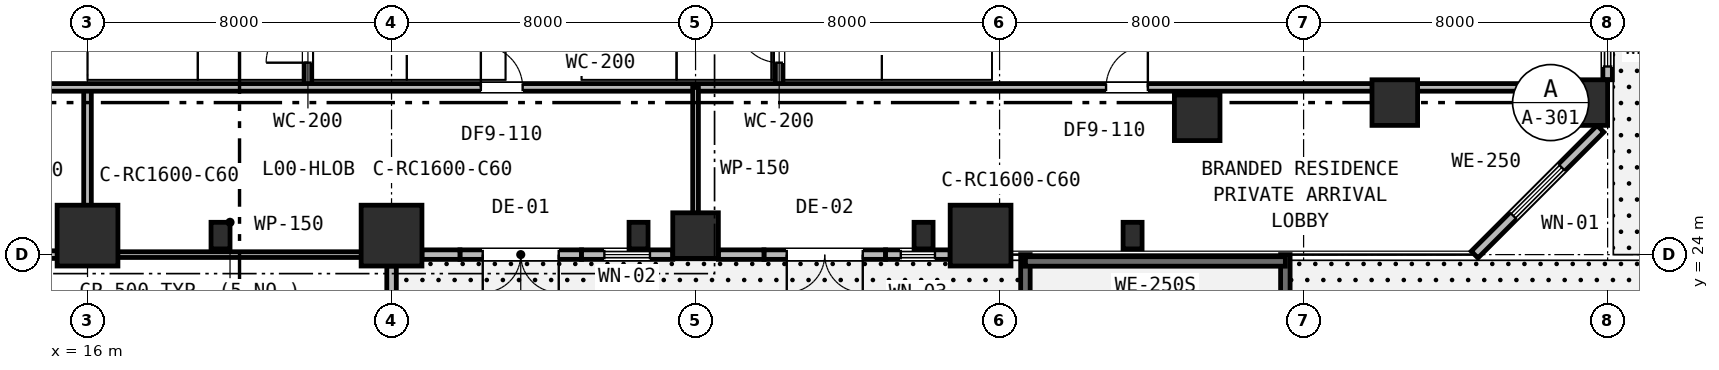
"""IFC4 building model, lengths in metres.
Left out: names, types, materials, properties, quantities, classifications, styles, units other than length and angle.
Written with IfcOpenShell. Run it as: python <this file> out.ifc"""

import sys

from ifc_helpers import new_model, si_unit, direction, frame, frame_2d, origin, origin_2d, place, context, subcontext, project, spatial, rectangle, extrude, element, fill, save


model = new_model("IFC4")
c1 = context("Model", 3, precision=1e-05, world=origin(), true_north=direction((0.0, 1.0)))
c2 = subcontext(c1, "Body", "Model", "MODEL_VIEW")
j1 = project(units=[si_unit("LENGTHUNIT", "METRE"), si_unit("PLANEANGLEUNIT", "RADIAN")], contexts=[c1])
p1 = place(None, origin())
s1 = spatial("IfcSite", under=j1, at=p1, CompositionType="ELEMENT")
p2 = place(p1, origin())
s2 = spatial("IfcBuilding", under=s1, at=p2, CompositionType="ELEMENT")
p3 = place(p2, origin())
s3 = spatial("IfcBuildingStorey", under=s2, at=p3, CompositionType="ELEMENT", Elevation=0.0)
for number, where, z_axis, x_axis in (
    (1, (16.0, 24.5, 0.0), (0.0, 0.0, 1.0), (1.0, 0.0, 0.0)),
    (2, (24.0, 24.5, 0.0), (0.0, 0.0, 1.0), (1.0, 0.0, 0.0)),
):
    element("IfcColumn", number, at=place(p3, frame(where, z_axis=z_axis, x_axis=x_axis)), inside=s3, PredefinedType="COLUMN", context=c2, shape_type="SweptSolid", body=[
        extrude(rectangle(XDim=1.6, YDim=1.6, at=origin_2d()), origin(), (0.0, 0.0, 1.0), 6.0),
    ])
p4 = place(p3, frame((32.0, 24.5, 0.0), z_axis=(0.0, 0.0, 1.0), x_axis=(1.0, 0.0, 0.0)))
e3 = element("IfcColumn", 3, at=p4, inside=s3, PredefinedType="COLUMN", context=c2, shape_type="SweptSolid", body=[
    extrude(rectangle(XDim=1.2, YDim=1.2, at=origin_2d()), origin(), (0.0, 0.0, 1.0), 6.0),
])
p5 = place(p3, frame((39.5, 24.5, 0.0), z_axis=(0.0, 0.0, 1.0), x_axis=(1.0, 0.0, 0.0)))
e4 = element("IfcColumn", 4, at=p5, inside=s3, PredefinedType="COLUMN", context=c2, shape_type="SweptSolid", body=[
    extrude(rectangle(XDim=1.6, YDim=1.6, at=origin_2d()), origin(), (0.0, 0.0, 1.0), 6.0),
])
for number, where, z_axis, x_axis in (
    (5, (45.2, 27.6, 0.0), (0.0, 0.0, 1.0), (1.0, 0.0, 0.0)),
    (6, (50.4, 28.0, 0.0), (0.0, 0.0, 1.0), (1.0, 0.0, 0.0)),
    (7, (55.4, 28.0, 0.0), (0.0, 0.0, 1.0), (1.0, 0.0, 0.0)),
):
    element("IfcColumn", number, at=place(p3, frame(where, z_axis=z_axis, x_axis=x_axis)), inside=s3, PredefinedType="COLUMN", context=c2, shape_type="SweptSolid", body=[
        extrude(rectangle(XDim=1.2, YDim=1.2, at=origin_2d()), origin(), (0.0, 0.0, 1.0), 6.0),
    ])
for number, where, z_axis, x_axis in (
    (8, (40.68, 4.25, 0.0), (0.0, 0.0, 1.0), (0.0, 1.0, 0.0)),
    (9, (47.52, 4.25, 0.0), (0.0, 0.0, 1.0), (0.0, 1.0, 0.0)),
):
    element("IfcWall", number, at=place(p3, frame(where, z_axis=z_axis, x_axis=x_axis)), inside=s3, PredefinedType="STANDARD", context=c2, shape_type="SweptSolid", body=[
        extrude(rectangle(XDim=19.75, YDim=0.25, at=frame_2d((9.875, 0.0))), origin(), (0.0, 0.0, 1.0), 4.2),
    ])
p6 = place(p3, frame((40.68, 23.82, 0.0), z_axis=(0.0, 0.0, 1.0), x_axis=(1.0, 0.0, 0.0)))
e10 = element("IfcWall", 10, at=p6, inside=s3, PredefinedType="STANDARD", context=c2, shape_type="SweptSolid", body=[
    extrude(rectangle(XDim=6.84, YDim=0.25, at=frame_2d((3.42, 0.0))), origin(), (0.0, 0.0, 1.0), 4.2),
])
p7 = place(p3, frame((24.0, 22.4, 0.0), z_axis=(0.0, 0.0, 1.0), x_axis=(0.0, 1.0, 0.0)))
e11 = element("IfcWall", 11, at=p7, inside=s3, PredefinedType="STANDARD", context=c2, shape_type="SweptSolid", body=[
    extrude(rectangle(XDim=1.3, YDim=0.25, at=frame_2d((0.65, 0.0))), origin(), (0.0, 0.0, 1.0), 5.67),
])
p8 = place(p3, frame((29.0, 24.0, 0.0), z_axis=(0.0, 0.0, 1.0), x_axis=(-1.0, 0.0, 0.0)))
e12 = element("IfcWall", 12, at=p8, inside=s3, PredefinedType="STANDARD", context=c2, shape_type="SweptSolid", body=[
    extrude(rectangle(XDim=3.2, YDim=0.25, at=frame_2d((1.6, 0.0))), origin(), (0.0, 0.0, 1.0), 5.21),
])
p9 = place(p8, frame((0.6, 0.0, 0.0)))
e13 = element("IfcOpeningElement", 13, at=p9, cuts=e12, PredefinedType="OPENING", context=c2, shape_type="SweptSolid", body=[
    extrude(rectangle(XDim=2.0, YDim=2.4, at=frame_2d((1.0, 1.2))), frame((0.0, 0.135, 0.0), z_axis=(0.0, -1.0, 0.0), x_axis=(1.0, 0.0, 0.0)), (0.0, 0.0, 1.0), 0.27),
])
p10 = place(p3, frame((37.0, 24.0, 0.0), z_axis=(0.0, 0.0, 1.0), x_axis=(-1.0, 0.0, 0.0)))
e14 = element("IfcWall", 14, at=p10, inside=s3, PredefinedType="STANDARD", context=c2, shape_type="SweptSolid", body=[
    extrude(rectangle(XDim=3.2, YDim=0.25, at=frame_2d((1.6, 0.0))), origin(), (0.0, 0.0, 1.0), 5.21),
])
p11 = place(p10, frame((0.6, 0.0, 0.0)))
e15 = element("IfcOpeningElement", 15, at=p11, cuts=e14, PredefinedType="OPENING", context=c2, shape_type="SweptSolid", body=[
    extrude(rectangle(XDim=2.0, YDim=2.4, at=frame_2d((1.0, 1.2))), frame((0.0, 0.135, 0.0), z_axis=(0.0, -1.0, 0.0), x_axis=(1.0, 0.0, 0.0)), (0.0, 0.0, 1.0), 0.27),
])
p12 = place(p3, frame((24.8, 24.0, 0.0), z_axis=(0.0, 0.0, 1.0), x_axis=(1.0, 0.0, 0.0)))
e16 = element("IfcWall", 16, at=p12, inside=s3, PredefinedType="STANDARD", context=c2, shape_type="SweptSolid", body=[
    extrude(rectangle(XDim=1.0, YDim=0.25, at=frame_2d((0.5, 0.0))), origin(), (0.0, 0.0, 1.0), 5.21),
])
p13 = place(p3, frame((29.0, 24.0, 0.0), z_axis=(0.0, 0.0, 1.0), x_axis=(1.0, 0.0, 0.0)))
e17 = element("IfcWall", 17, at=p13, inside=s3, PredefinedType="STANDARD", context=c2, shape_type="SweptSolid", body=[
    extrude(rectangle(XDim=2.4, YDim=0.25, at=frame_2d((1.2, 0.0))), origin(), (0.0, 0.0, 1.0), 5.21),
])
p14 = place(p13, frame((0.6, 0.0, 0.85)))
e18 = element("IfcOpeningElement", 18, at=p14, cuts=e17, PredefinedType="OPENING", context=c2, shape_type="SweptSolid", body=[
    extrude(rectangle(XDim=1.2, YDim=1.6, at=frame_2d((0.6, 0.8))), frame((0.0, 0.135, 0.0), z_axis=(0.0, -1.0, 0.0), x_axis=(1.0, 0.0, 0.0)), (0.0, 0.0, 1.0), 0.27),
])
p15 = place(p3, frame((32.6, 24.0, 0.0), z_axis=(0.0, 0.0, 1.0), x_axis=(1.0, 0.0, 0.0)))
e19 = element("IfcWall", 19, at=p15, inside=s3, PredefinedType="STANDARD", context=c2, shape_type="SweptSolid", body=[
    extrude(rectangle(XDim=1.2, YDim=0.25, at=frame_2d((0.6, 0.0))), origin(), (0.0, 0.0, 1.0), 5.21),
])
p16 = place(p3, frame((37.0, 24.0, 0.0), z_axis=(0.0, 0.0, 1.0), x_axis=(1.0, 0.0, 0.0)))
e20 = element("IfcWall", 20, at=p16, inside=s3, PredefinedType="STANDARD", context=c2, shape_type="SweptSolid", body=[
    extrude(rectangle(XDim=1.7, YDim=0.25, at=frame_2d((0.85, 0.0))), origin(), (0.0, 0.0, 1.0), 5.21),
])
p17 = place(p16, frame((0.4, 0.0, 0.9)))
e21 = element("IfcOpeningElement", 21, at=p17, cuts=e20, PredefinedType="OPENING", context=c2, shape_type="SweptSolid", body=[
    extrude(rectangle(XDim=0.9, YDim=1.55, at=frame_2d((0.45, 0.775))), frame((0.0, 0.135, 0.0), z_axis=(0.0, -1.0, 0.0), x_axis=(1.0, 0.0, 0.0)), (0.0, 0.0, 1.0), 0.27),
])
p18 = place(p3, frame((52.5, 24.0, 0.0), z_axis=(0.0, 0.0, 1.0), x_axis=(0.707106781187, 0.707106781187, 0.0)))
e22 = element("IfcWall", 22, at=p18, inside=s3, PredefinedType="STANDARD", context=c2, shape_type="SweptSolid", body=[
    extrude(rectangle(XDim=4.683, YDim=0.25, at=frame_2d((2.342, 0.0))), origin(), (0.0, 0.0, 1.0), 5.67),
])
p19 = place(p18, frame((1.442, 0.0, 0.75)))
e23 = element("IfcOpeningElement", 23, at=p19, cuts=e22, PredefinedType="OPENING", context=c2, shape_type="SweptSolid", body=[
    extrude(rectangle(XDim=1.8, YDim=1.85, at=frame_2d((0.9, 0.925))), frame((0.0, 0.135, 0.0), z_axis=(0.0, -1.0, 0.0), x_axis=(1.0, 0.0, 0.0)), (0.0, 0.0, 1.0), 0.27),
])
p20 = place(p3, frame((56.0, 28.6, 0.0), z_axis=(0.0, 0.0, 1.0), x_axis=(0.0, 1.0, 0.0)))
e24 = element("IfcWall", 24, at=p20, inside=s3, PredefinedType="STANDARD", context=c2, shape_type="SweptSolid", body=[
    extrude(rectangle(XDim=1.6, YDim=0.25, at=frame_2d((0.8, 0.0))), origin(), (0.0, 0.0, 1.0), 5.67),
])
p21 = place(p20, frame((0.35, 0.0, 0.9)))
e25 = element("IfcOpeningElement", 25, at=p21, cuts=e24, PredefinedType="OPENING", context=c2, shape_type="SweptSolid", body=[
    extrude(rectangle(XDim=0.9, YDim=1.55, at=frame_2d((0.45, 0.775))), frame((0.0, 0.135, 0.0), z_axis=(0.0, -1.0, 0.0), x_axis=(1.0, 0.0, 0.0)), (0.0, 0.0, 1.0), 0.27),
])
p22 = place(p3, frame((21.8, 28.4, 0.0), z_axis=(0.0, 0.0, 1.0), x_axis=(0.0, 1.0, 0.0)))
e26 = element("IfcWall", 26, at=p22, inside=s3, PredefinedType="PARTITIONING", context=c2, shape_type="SweptSolid", body=[
    extrude(rectangle(XDim=2.4, YDim=0.2, at=frame_2d((1.2, 0.0))), origin(), (0.0, 0.0, 1.0), 5.26),
])
p23 = place(p22, frame((0.65, 0.0, 0.0)))
e27 = element("IfcOpeningElement", 27, at=p23, cuts=e26, PredefinedType="OPENING", context=c2, shape_type="SweptSolid", body=[
    extrude(rectangle(XDim=1.1, YDim=2.15, at=frame_2d((0.55, 1.075))), frame((0.0, 0.11, 0.0), z_axis=(0.0, -1.0, 0.0), x_axis=(1.0, 0.0, 0.0)), (0.0, 0.0, 1.0), 0.22),
])
p24 = place(p3, frame((34.2, 28.4, 0.0), z_axis=(0.0, 0.0, 1.0), x_axis=(0.0, 1.0, 0.0)))
e28 = element("IfcWall", 28, at=p24, inside=s3, PredefinedType="PARTITIONING", context=c2, shape_type="SweptSolid", body=[
    extrude(rectangle(XDim=2.4, YDim=0.2, at=frame_2d((1.2, 0.0))), origin(), (0.0, 0.0, 1.0), 5.26),
])
p25 = place(p24, frame((0.65, 0.0, 0.0)))
e29 = element("IfcOpeningElement", 29, at=p25, cuts=e28, PredefinedType="OPENING", context=c2, shape_type="SweptSolid", body=[
    extrude(rectangle(XDim=1.1, YDim=2.15, at=frame_2d((0.55, 1.075))), frame((0.0, 0.11, 0.0), z_axis=(0.0, -1.0, 0.0), x_axis=(1.0, 0.0, 0.0)), (0.0, 0.0, 1.0), 0.22),
])
p26 = place(p3, frame((16.0, 24.0, 0.0), z_axis=(0.0, 0.0, 1.0), x_axis=(0.0, 1.0, 0.0)))
e30 = element("IfcWall", 30, at=p26, inside=s3, PredefinedType="PARTITIONING", context=c2, shape_type="SweptSolid", body=[
    extrude(rectangle(XDim=4.4, YDim=0.2, at=frame_2d((2.2, 0.0))), origin(), (0.0, 0.0, 1.0), 5.02),
])
p27 = place(p3, frame((8.6, 24.0, 0.0), z_axis=(0.0, 0.0, 1.0), x_axis=(1.0, 0.0, 0.0)))
e31 = element("IfcWall", 31, at=p27, inside=s3, PredefinedType="PARTITIONING", context=c2, shape_type="SweptSolid", body=[
    extrude(rectangle(XDim=7.4, YDim=0.2, at=frame_2d((3.7, 0.0))), origin(), (0.0, 0.0, 1.0), 5.02),
])
p28 = place(p3, frame((3.1, 28.4, 0.0), z_axis=(0.0, 0.0, 1.0), x_axis=(1.0, 0.0, 0.0)))
e32 = element("IfcWall", 32, at=p28, inside=s3, PredefinedType="PARTITIONING", context=c2, shape_type="SweptSolid", body=[
    extrude(rectangle(XDim=52.8, YDim=0.2, at=frame_2d((26.4, 0.0))), origin(), (0.0, 0.0, 1.0), 5.02),
])
p29 = place(p28, frame((8.7, 0.0, 0.0)))
e33 = element("IfcOpeningElement", 33, at=p29, cuts=e32, PredefinedType="OPENING", context=c2, shape_type="SweptSolid", body=[
    extrude(rectangle(XDim=1.0, YDim=2.15, at=frame_2d((0.5, 1.075))), frame((0.0, 0.11, 0.0), z_axis=(0.0, -1.0, 0.0), x_axis=(1.0, 0.0, 0.0)), (0.0, 0.0, 1.0), 0.22),
])
p30 = place(p28, frame((23.25, 0.0, 0.0)))
e34 = element("IfcOpeningElement", 34, at=p30, cuts=e32, PredefinedType="OPENING", context=c2, shape_type="SweptSolid", body=[
    extrude(rectangle(XDim=1.1, YDim=2.15, at=frame_2d((0.55, 1.075))), frame((0.0, 0.11, 0.0), z_axis=(0.0, -1.0, 0.0), x_axis=(1.0, 0.0, 0.0)), (0.0, 0.0, 1.0), 0.22),
])
p31 = place(p28, frame((39.702, 0.0, 0.0)))
e35 = element("IfcOpeningElement", 35, at=p31, cuts=e32, PredefinedType="OPENING", context=c2, shape_type="SweptSolid", body=[
    extrude(rectangle(XDim=1.1, YDim=2.15, at=frame_2d((0.55, 1.075))), frame((0.0, 0.11, 0.0), z_axis=(0.0, -1.0, 0.0), x_axis=(1.0, 0.0, 0.0)), (0.0, 0.0, 1.0), 0.22),
])
p32 = place(p28, frame((3.34, 0.0, 0.0)))
e36 = element("IfcOpeningElement", 36, at=p32, cuts=e32, PredefinedType="OPENING", context=c2, shape_type="SweptSolid", body=[
    extrude(rectangle(XDim=1.1, YDim=2.15, at=frame_2d((0.55, 1.075))), frame((0.0, 0.11, 0.0), z_axis=(0.0, -1.0, 0.0), x_axis=(1.0, 0.0, 0.0)), (0.0, 0.0, 1.0), 0.22),
])
p33 = place(p3, frame((16.0, 24.0, 0.0), z_axis=(0.0, 0.0, 1.0), x_axis=(1.0, 0.0, 0.0)))
e37 = element("IfcWall", 37, at=p33, inside=s3, PredefinedType="PARTITIONING", context=c2, shape_type="SweptSolid", body=[
    extrude(rectangle(XDim=7.9, YDim=0.15, at=frame_2d((3.95, 0.0))), origin(), (0.0, 0.0, 1.0), 5.02),
])
p34 = place(p3, frame((32.0, 24.1, 0.0), z_axis=(0.0, 0.0, 1.0), x_axis=(0.0, 1.0, 0.0)))
e38 = element("IfcWall", 38, at=p34, inside=s3, PredefinedType="PARTITIONING", context=c2, shape_type="SweptSolid", body=[
    extrude(rectangle(XDim=4.3, YDim=0.15, at=frame_2d((2.15, 0.0))), origin(), (0.0, 0.0, 1.0), 5.21),
])
for number, where, z_axis, x_axis in (
    (39, (19.5, 24.5, 0.0), (0.0, 0.0, 1.0), (1.0, 0.0, 0.0)),
    (40, (30.5, 24.5, 0.0), (0.0, 0.0, 1.0), (1.0, 0.0, 0.0)),
    (41, (38.0, 24.5, 0.0), (0.0, 0.0, 1.0), (1.0, 0.0, 0.0)),
    (42, (43.5, 24.5, 0.0), (0.0, 0.0, 1.0), (1.0, 0.0, 0.0)),
):
    element("IfcColumn", number, at=place(p3, frame(where, z_axis=z_axis, x_axis=x_axis)), inside=s3, PredefinedType="PILASTER", context=c2, shape_type="SweptSolid", body=[
        extrude(rectangle(XDim=0.5, YDim=0.7, at=origin_2d()), origin(), (0.0, 0.0, 1.0), 5.68),
    ])
p35 = place(p9, origin())
e43 = element("IfcDoor", 43, at=p35, inside=s3, OperationType="DOUBLE_DOOR_SINGLE_SWING", PredefinedType="DOOR", context=c2, shape_type="SweptSolid", body=[
    extrude(rectangle(XDim=2.0, YDim=2.4, at=frame_2d((1.0, 1.2))), frame((0.0, 0.025, 0.0), z_axis=(0.0, -1.0, 0.0), x_axis=(1.0, 0.0, 0.0)), (0.0, 0.0, 1.0), 0.05),
])
fill(e13, e43)
p36 = place(p11, origin())
e44 = element("IfcDoor", 44, at=p36, inside=s3, OperationType="DOUBLE_DOOR_SINGLE_SWING", PredefinedType="DOOR", context=c2, shape_type="SweptSolid", body=[
    extrude(rectangle(XDim=2.0, YDim=2.4, at=frame_2d((1.0, 1.2))), frame((0.0, 0.025, 0.0), z_axis=(0.0, -1.0, 0.0), x_axis=(1.0, 0.0, 0.0)), (0.0, 0.0, 1.0), 0.05),
])
fill(e15, e44)
p37 = place(p14, origin())
e45 = element("IfcWindow", 45, at=p37, inside=s3, PartitioningType="SINGLE_PANEL", PredefinedType="WINDOW", context=c2, shape_type="SweptSolid", body=[
    extrude(rectangle(XDim=1.2, YDim=1.6, at=frame_2d((0.6, 0.8))), frame((0.0, 0.03, 0.0), z_axis=(0.0, -1.0, 0.0), x_axis=(1.0, 0.0, 0.0)), (0.0, 0.0, 1.0), 0.06),
])
fill(e18, e45)
p38 = place(p17, origin())
e46 = element("IfcWindow", 46, at=p38, inside=s3, PartitioningType="SINGLE_PANEL", PredefinedType="WINDOW", context=c2, shape_type="SweptSolid", body=[
    extrude(rectangle(XDim=0.9, YDim=1.55, at=frame_2d((0.45, 0.775))), frame((0.0, 0.03, 0.0), z_axis=(0.0, -1.0, 0.0), x_axis=(1.0, 0.0, 0.0)), (0.0, 0.0, 1.0), 0.06),
])
fill(e21, e46)
p39 = place(p19, origin())
e47 = element("IfcWindow", 47, at=p39, inside=s3, PartitioningType="SINGLE_PANEL", PredefinedType="WINDOW", context=c2, shape_type="SweptSolid", body=[
    extrude(rectangle(XDim=1.8, YDim=1.85, at=frame_2d((0.9, 0.925))), frame((0.0, 0.03, 0.0), z_axis=(0.0, -1.0, 0.0), x_axis=(1.0, 0.0, 0.0)), (0.0, 0.0, 1.0), 0.06),
])
fill(e23, e47)
p40 = place(p21, origin())
e48 = element("IfcWindow", 48, at=p40, inside=s3, PartitioningType="SINGLE_PANEL", PredefinedType="WINDOW", context=c2, shape_type="SweptSolid", body=[
    extrude(rectangle(XDim=0.9, YDim=1.55, at=frame_2d((0.45, 0.775))), frame((0.0, 0.03, 0.0), z_axis=(0.0, -1.0, 0.0), x_axis=(1.0, 0.0, 0.0)), (0.0, 0.0, 1.0), 0.06),
])
fill(e25, e48)
p41 = place(p23, origin())
e49 = element("IfcDoor", 49, at=p41, inside=s3, OperationType="SINGLE_SWING_LEFT", PredefinedType="DOOR", context=c2, shape_type="SweptSolid", body=[
    extrude(rectangle(XDim=1.1, YDim=2.15, at=frame_2d((0.55, 1.075))), frame((0.0, 0.025, 0.0), z_axis=(0.0, -1.0, 0.0), x_axis=(1.0, 0.0, 0.0)), (0.0, 0.0, 1.0), 0.05),
])
fill(e27, e49)
p42 = place(p25, origin())
e50 = element("IfcDoor", 50, at=p42, inside=s3, OperationType="SINGLE_SWING_RIGHT", PredefinedType="DOOR", context=c2, shape_type="SweptSolid", body=[
    extrude(rectangle(XDim=1.1, YDim=2.15, at=frame_2d((0.55, 1.075))), frame((0.0, 0.025, 0.0), z_axis=(0.0, -1.0, 0.0), x_axis=(1.0, 0.0, 0.0)), (0.0, 0.0, 1.0), 0.05),
])
fill(e29, e50)
p43 = place(p30, origin())
e51 = element("IfcDoor", 51, at=p43, inside=s3, OperationType="SINGLE_SWING_LEFT", PredefinedType="DOOR", context=c2, shape_type="SweptSolid", body=[
    extrude(rectangle(XDim=1.1, YDim=2.15, at=frame_2d((0.55, 1.075))), frame((0.0, 0.025, 0.0), z_axis=(0.0, -1.0, 0.0), x_axis=(1.0, 0.0, 0.0)), (0.0, 0.0, 1.0), 0.05),
])
fill(e34, e51)
p44 = place(p31, origin())
e52 = element("IfcDoor", 52, at=p44, inside=s3, OperationType="SINGLE_SWING_RIGHT", PredefinedType="DOOR", context=c2, shape_type="SweptSolid", body=[
    extrude(rectangle(XDim=1.1, YDim=2.15, at=frame_2d((0.55, 1.075))), frame((0.0, 0.025, 0.0), z_axis=(0.0, -1.0, 0.0), x_axis=(1.0, 0.0, 0.0)), (0.0, 0.0, 1.0), 0.05),
])
fill(e35, e52)
save(model, sys.argv[1])
